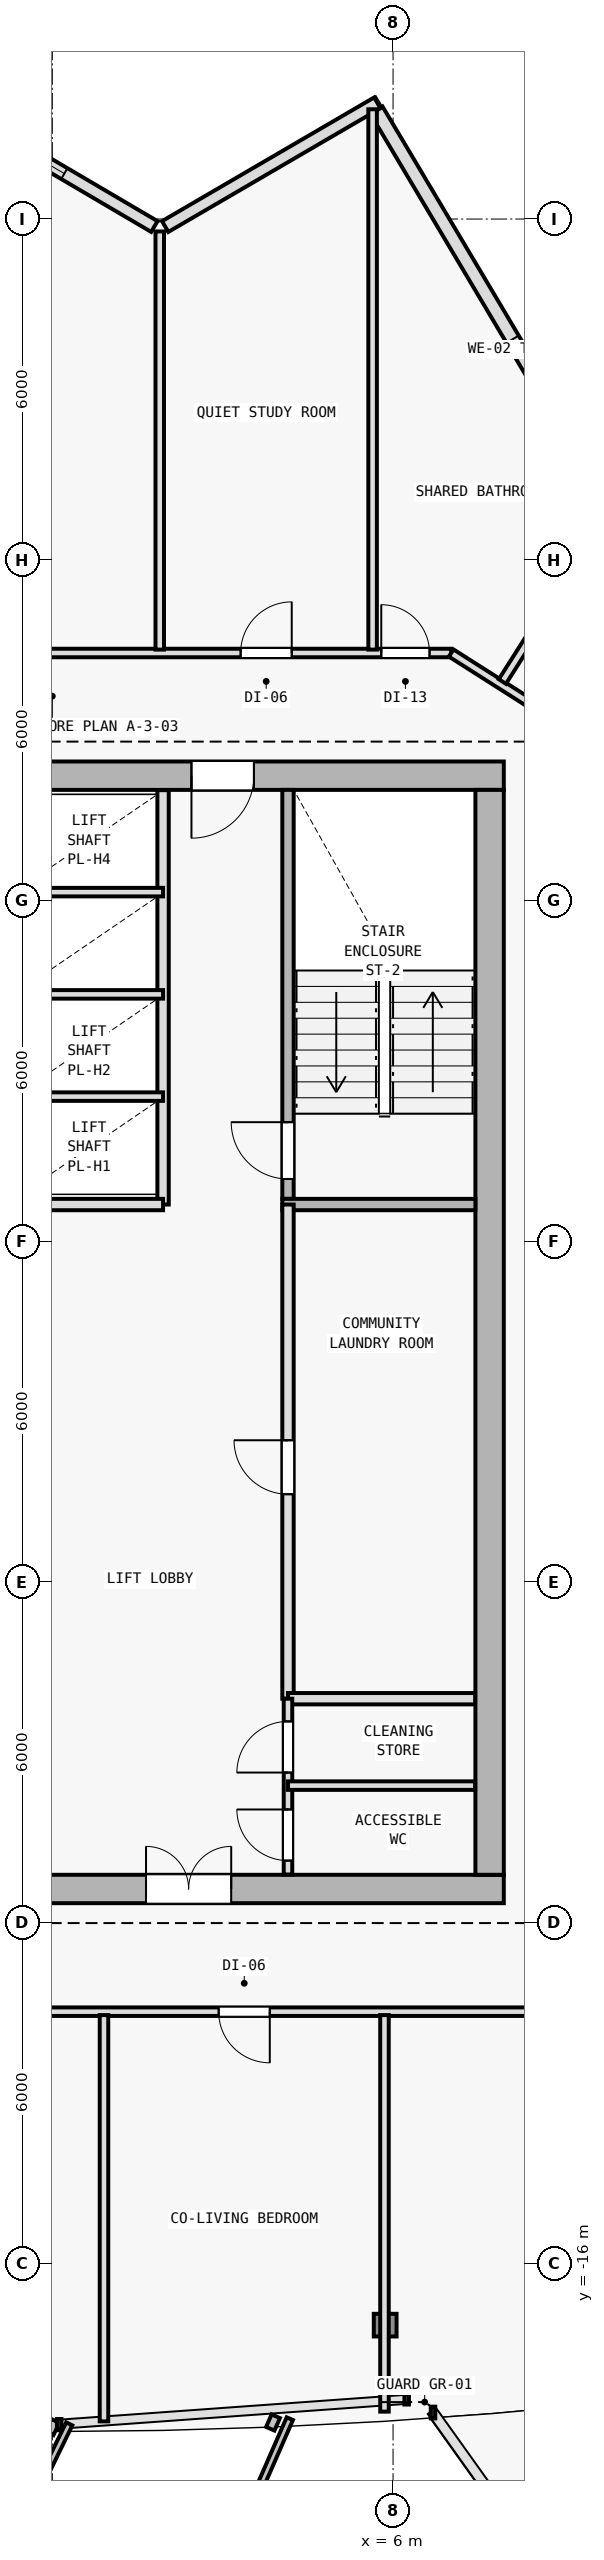
"""IFC4 building model, lengths in metres.
Left out: names, types, materials, properties, quantities, classifications, styles, units other than length and angle.
Written with IfcOpenShell. Run it as: python <this file> out.ifc"""

import sys

from ifc_helpers import new_model, si_unit, direction, frame, frame_2d, origin, origin_2d, place, context, subcontext, project, spatial, rectangle, i_section, extrude, element, fill, save


model = new_model("IFC4")
c1 = context("Model", 3, precision=1e-05, world=origin(), true_north=direction((0.0, 1.0)))
c2 = subcontext(c1, "Body", "Model", "MODEL_VIEW")
j1 = project(units=[si_unit("LENGTHUNIT", "METRE"), si_unit("PLANEANGLEUNIT", "RADIAN")], contexts=[c1])
p1 = place(None, origin())
s1 = spatial("IfcSite", under=j1, at=p1, CompositionType="ELEMENT")
p2 = place(p1, origin())
s2 = spatial("IfcBuilding", under=s1, at=p2, CompositionType="ELEMENT")
p3 = place(p2, frame((0.0, 0.0, 171.0)))
s3 = spatial("IfcBuildingStorey", under=s2, at=p3, CompositionType="ELEMENT", Elevation=171.0)
for number, where, z_axis, x_axis in (
    (1, (7.7, -9.4, 0.0), (0.0, 0.0, 1.0), (1.0, 0.0, 0.0)),
    (2, (7.7, 10.2, 0.0), (0.0, 0.0, 1.0), (1.0, 0.0, 0.0)),
    (3, (0.0, -9.4, 0.0), (0.0, 0.0, 1.0), (1.0, 0.0, 0.0)),
    (4, (7.7, 0.4, 0.0), (0.0, 0.0, 1.0), (1.0, 0.0, 0.0)),
):
    element("IfcColumn", number, at=place(p3, frame(where, z_axis=z_axis, x_axis=x_axis)), inside=s3, PredefinedType="COLUMN", context=c2, shape_type="SweptSolid", body=[
        extrude(i_section(OverallWidth=0.404, OverallDepth=0.407, WebThickness=0.017, FlangeThickness=0.028, FilletRadius=0.015, at=origin_2d()), origin(), (0.0, 0.0, 1.0), 3.6),
    ])
p4 = place(p3, frame((5.861, -17.079, 0.006), z_axis=(-0.006934288159, 0.035283289748, 0.999353293441), x_axis=(-0.981229659911, -0.192842823335, 0.0)))
e5 = element("IfcColumn", 5, at=p4, inside=s3, PredefinedType="COLUMN", context=c2, shape_type="SweptSolid", body=[
    extrude(i_section(OverallWidth=0.401, OverallDepth=0.399, WebThickness=0.016, FlangeThickness=0.025, FilletRadius=0.015, at=origin_2d()), origin(), (0.0, 0.0, 1.0), 3.591),
])
p5 = place(p3, frame((5.706, 21.919, 0.0), z_axis=(0.0, 0.0, 1.0), x_axis=(0.511079110892, -0.859533677298, 0.0)))
e6 = element("IfcWall", 6, at=p5, inside=s3, PredefinedType="SOLIDWALL", context=c2, shape_type="SweptSolid", body=[
    extrude(rectangle(XDim=10.489, YDim=0.25, at=frame_2d((5.245, 0.0))), origin(), (0.0, 0.0, 1.0), 3.35),
])
p6 = place(p5, frame((4.695, 0.0, 0.62)))
e7 = element("IfcOpeningElement", 7, at=p6, cuts=e6, PredefinedType="OPENING", context=c2, shape_type="SweptSolid", body=[
    extrude(rectangle(XDim=1.1, YDim=1.8, at=frame_2d((0.55, 0.9))), frame((0.0, 0.135, 0.0), z_axis=(0.0, -1.0, 0.0), x_axis=(1.0, 0.0, 0.0)), (0.0, 0.0, 1.0), 0.27),
])
p7 = place(p3, frame((1.987, 19.868, 0.0), z_axis=(0.0, 0.0, 1.0), x_axis=(0.863979520686, 0.503526948469, 0.0)))
e8 = element("IfcWall", 8, at=p7, inside=s3, PredefinedType="SOLIDWALL", context=c2, shape_type="SweptSolid", body=[
    extrude(rectangle(XDim=4.324, YDim=0.22, at=frame_2d((2.162, 0.0))), origin(), (0.0, 0.0, 1.0), 3.35),
])
p8 = place(p3, frame((-2.322, 22.289, 0.0), z_axis=(0.0, 0.0, 1.0), x_axis=(0.862111523483, -0.506718581738, 0.0)))
e9 = element("IfcWall", 9, at=p8, inside=s3, PredefinedType="SOLIDWALL", context=c2, shape_type="SweptSolid", body=[
    extrude(rectangle(XDim=4.777, YDim=0.22, at=frame_2d((2.389, 0.0))), origin(), (0.0, 0.0, 1.0), 3.35),
])
p9 = place(p8, frame((1.839, 0.0, 0.62)))
e10 = element("IfcOpeningElement", 10, at=p9, cuts=e9, PredefinedType="OPENING", context=c2, shape_type="SweptSolid", body=[
    extrude(rectangle(XDim=1.1, YDim=1.8, at=frame_2d((0.55, 0.9))), frame((0.0, 0.12, 0.0), z_axis=(0.0, -1.0, 0.0), x_axis=(1.0, 0.0, 0.0)), (0.0, 0.0, 1.0), 0.24),
])
p10 = place(p3, frame((-7.95, -9.4, 0.0), z_axis=(0.0, 0.0, 1.0), x_axis=(1.0, 0.0, 0.0)))
e11 = element("IfcWall", 11, at=p10, inside=s3, PredefinedType="SHEAR", context=c2, shape_type="SweptSolid", body=[
    extrude(rectangle(XDim=15.9, YDim=0.5, at=frame_2d((7.95, 0.0))), origin(), (0.0, 0.0, 1.0), 3.35),
])
p11 = place(p10, frame((9.6, 0.0, 0.0)))
e12 = element("IfcOpeningElement", 12, at=p11, cuts=e11, PredefinedType="OPENING", context=c2, shape_type="SweptSolid", body=[
    extrude(rectangle(XDim=1.5, YDim=2.2, at=frame_2d((0.75, 1.1))), frame((0.0, 0.26, 0.0), z_axis=(0.0, -1.0, 0.0), x_axis=(1.0, 0.0, 0.0)), (0.0, 0.0, 1.0), 0.52),
])
p12 = place(p3, frame((7.95, 10.2, 0.0), z_axis=(0.0, 0.0, 1.0), x_axis=(-1.0, 0.0, 0.0)))
e13 = element("IfcWall", 13, at=p12, inside=s3, PredefinedType="SHEAR", context=c2, shape_type="SweptSolid", body=[
    extrude(rectangle(XDim=15.9, YDim=0.5, at=frame_2d((7.95, 0.0))), origin(), (0.0, 0.0, 1.0), 3.35),
])
p13 = place(p12, frame((4.4, 0.0, 0.0)))
e14 = element("IfcOpeningElement", 14, at=p13, cuts=e13, PredefinedType="OPENING", context=c2, shape_type="SweptSolid", body=[
    extrude(rectangle(XDim=1.1, YDim=2.15, at=frame_2d((0.55, 1.075))), frame((0.0, 0.26, 0.0), z_axis=(0.0, -1.0, 0.0), x_axis=(1.0, 0.0, 0.0)), (0.0, 0.0, 1.0), 0.52),
])
p14 = place(p3, frame((7.7, 9.95, 0.0), z_axis=(0.0, 0.0, 1.0), x_axis=(0.0, -1.0, 0.0)))
e15 = element("IfcWall", 15, at=p14, inside=s3, PredefinedType="SHEAR", context=c2, shape_type="SweptSolid", body=[
    extrude(rectangle(XDim=19.1, YDim=0.5, at=frame_2d((9.55, 0.0))), origin(), (0.0, 0.0, 1.0), 3.35),
])
p15 = place(p3, frame((4.15, 2.75, 0.0), z_axis=(0.0, 0.0, 1.0), x_axis=(0.0, 1.0, 0.0)))
e16 = element("IfcWall", 16, at=p15, inside=s3, PredefinedType="SOLIDWALL", context=c2, shape_type="SweptSolid", body=[
    extrude(rectangle(XDim=7.2, YDim=0.2, at=frame_2d((3.6, 0.0))), origin(), (0.0, 0.0, 1.0), 3.35),
])
p16 = place(p15, frame((0.35, 0.0, 0.0)))
e17 = element("IfcOpeningElement", 17, at=p16, cuts=e16, PredefinedType="OPENING", context=c2, shape_type="SweptSolid", body=[
    extrude(rectangle(XDim=1.0, YDim=2.15, at=frame_2d((0.5, 1.075))), frame((0.0, 0.11, 0.0), z_axis=(0.0, -1.0, 0.0), x_axis=(1.0, 0.0, 0.0)), (0.0, 0.0, 1.0), 0.22),
])
p17 = place(p3, frame((4.05, 2.65, 0.0), z_axis=(0.0, 0.0, 1.0), x_axis=(1.0, 0.0, 0.0)))
e18 = element("IfcWall", 18, at=p17, inside=s3, PredefinedType="SOLIDWALL", context=c2, shape_type="SweptSolid", body=[
    extrude(rectangle(XDim=3.4, YDim=0.2, at=frame_2d((1.7, 0.0))), origin(), (0.0, 0.0, 1.0), 3.35),
])
p18 = place(p3, frame((4.15, -6.05, 0.0), z_axis=(0.0, 0.0, 1.0), x_axis=(0.0, 1.0, 0.0)))
e19 = element("IfcWall", 19, at=p18, inside=s3, PredefinedType="SOLIDWALL", context=c2, shape_type="SweptSolid", body=[
    extrude(rectangle(XDim=8.7, YDim=0.2, at=frame_2d((4.35, 0.0))), origin(), (0.0, 0.0, 1.0), 3.35),
])
p19 = place(p18, frame((3.6, 0.0, 0.0)))
e20 = element("IfcOpeningElement", 20, at=p19, cuts=e19, PredefinedType="OPENING", context=c2, shape_type="SweptSolid", body=[
    extrude(rectangle(XDim=0.95, YDim=2.1, at=frame_2d((0.475, 1.05))), frame((0.0, 0.11, 0.0), z_axis=(0.0, -1.0, 0.0), x_axis=(1.0, 0.0, 0.0)), (0.0, 0.0, 1.0), 0.22),
])
p20 = place(p3, frame((1.95, 2.65, 0.0), z_axis=(0.0, 0.0, 1.0), x_axis=(0.0, 1.0, 0.0)))
e21 = element("IfcWall", 21, at=p20, inside=s3, PredefinedType="SOLIDWALL", context=c2, shape_type="SweptSolid", body=[
    extrude(rectangle(XDim=7.295, YDim=0.2, at=frame_2d((3.647, 0.0))), origin(), (0.0, 0.0, 1.0), 3.35),
])
p21 = place(p3, frame((-0.95, 2.65, 0.0), z_axis=(0.0, 0.0, 1.0), x_axis=(1.0, 0.0, 0.0)))
e22 = element("IfcWall", 22, at=p21, inside=s3, PredefinedType="SOLIDWALL", context=c2, shape_type="SweptSolid", body=[
    extrude(rectangle(XDim=2.9, YDim=0.2, at=frame_2d((1.45, 0.0))), origin(), (0.0, 0.0, 1.0), 3.35),
])
for number, where, z_axis, x_axis in (
    (23, (-0.75, 4.55, 0.0), (0.0, 0.0, 1.0), (1.0, 0.0, 0.0)),
    (24, (-0.75, 6.35, 0.0), (0.0, 0.0, 1.0), (1.0, 0.0, 0.0)),
    (25, (-0.75, 8.15, 0.0), (0.0, 0.0, 1.0), (1.0, 0.0, 0.0)),
):
    element("IfcWall", number, at=place(p3, frame(where, z_axis=z_axis, x_axis=x_axis)), inside=s3, PredefinedType="PARTITIONING", context=c2, shape_type="SweptSolid", body=[
        extrude(rectangle(XDim=2.7, YDim=0.15, at=frame_2d((1.35, 0.0))), origin(), (0.0, 0.0, 1.0), 3.35),
    ])
p22 = place(p3, frame((4.15, -6.05, 0.0), z_axis=(0.0, 0.0, 1.0), x_axis=(1.0, 0.0, 0.0)))
e26 = element("IfcWall", 26, at=p22, inside=s3, PredefinedType="SOLIDWALL", context=c2, shape_type="SweptSolid", body=[
    extrude(rectangle(XDim=3.295, YDim=0.2, at=frame_2d((1.647, 0.0))), origin(), (0.0, 0.0, 1.0), 3.35),
])
p23 = place(p3, frame((4.15, -9.145, 0.0), z_axis=(0.0, 0.0, 1.0), x_axis=(0.0, 1.0, 0.0)))
e27 = element("IfcWall", 27, at=p23, inside=s3, PredefinedType="PARTITIONING", context=c2, shape_type="SweptSolid", body=[
    extrude(rectangle(XDim=3.095, YDim=0.15, at=frame_2d((1.547, 0.0))), origin(), (0.0, 0.0, 1.0), 3.35),
])
p24 = place(p23, frame((0.245, 0.0, 0.0)))
e28 = element("IfcOpeningElement", 28, at=p24, cuts=e27, PredefinedType="OPENING", context=c2, shape_type="SweptSolid", body=[
    extrude(rectangle(XDim=0.9, YDim=2.1, at=frame_2d((0.45, 1.05))), frame((0.0, 0.085, 0.0), z_axis=(0.0, -1.0, 0.0), x_axis=(1.0, 0.0, 0.0)), (0.0, 0.0, 1.0), 0.17),
])
p25 = place(p23, frame((1.795, 0.0, 0.0)))
e29 = element("IfcOpeningElement", 29, at=p25, cuts=e27, PredefinedType="OPENING", context=c2, shape_type="SweptSolid", body=[
    extrude(rectangle(XDim=0.9, YDim=2.1, at=frame_2d((0.45, 1.05))), frame((0.0, 0.085, 0.0), z_axis=(0.0, -1.0, 0.0), x_axis=(1.0, 0.0, 0.0)), (0.0, 0.0, 1.0), 0.17),
])
p26 = place(p3, frame((4.15, -7.58, 0.0), z_axis=(0.0, 0.0, 1.0), x_axis=(1.0, 0.0, 0.0)))
e30 = element("IfcWall", 30, at=p26, inside=s3, PredefinedType="PARTITIONING", context=c2, shape_type="SweptSolid", body=[
    extrude(rectangle(XDim=3.295, YDim=0.15, at=frame_2d((1.647, 0.0))), origin(), (0.0, 0.0, 1.0), 3.35),
])
p27 = place(p3, frame((-7.041, 12.36, 0.0), z_axis=(0.0, 0.0, 1.0), x_axis=(1.0, 0.0, 0.0)))
e31 = element("IfcWall", 31, at=p27, inside=s3, PredefinedType="PARTITIONING", context=c2, shape_type="SweptSolid", body=[
    extrude(rectangle(XDim=14.064, YDim=0.15, at=frame_2d((7.032, 0.0))), origin(), (0.0, 0.0, 1.0), 2.965),
])
p28 = place(p27, frame((12.833, 0.0, 0.0)))
e32 = element("IfcOpeningElement", 32, at=p28, cuts=e31, PredefinedType="OPENING", context=c2, shape_type="SweptSolid", body=[
    extrude(rectangle(XDim=0.85, YDim=2.1, at=frame_2d((0.425, 1.05))), frame((0.0, 0.085, 0.0), z_axis=(0.0, -1.0, 0.0), x_axis=(1.0, 0.0, 0.0)), (0.0, 0.0, 1.0), 0.17),
])
p29 = place(p27, frame((10.357, 0.0, 0.0)))
e33 = element("IfcOpeningElement", 33, at=p29, cuts=e31, PredefinedType="OPENING", context=c2, shape_type="SweptSolid", body=[
    extrude(rectangle(XDim=0.9, YDim=2.1, at=frame_2d((0.45, 1.05))), frame((0.0, 0.085, 0.0), z_axis=(0.0, -1.0, 0.0), x_axis=(1.0, 0.0, 0.0)), (0.0, 0.0, 1.0), 0.17),
])
p30 = place(p27, frame((4.167, 0.0, 0.0)))
e34 = element("IfcOpeningElement", 34, at=p30, cuts=e31, PredefinedType="OPENING", context=c2, shape_type="SweptSolid", body=[
    extrude(rectangle(XDim=0.9, YDim=2.1, at=frame_2d((0.45, 1.05))), frame((0.0, 0.085, 0.0), z_axis=(0.0, -1.0, 0.0), x_axis=(1.0, 0.0, 0.0)), (0.0, 0.0, 1.0), 0.17),
])
p31 = place(p3, frame((7.023, 12.36, 0.0), z_axis=(0.0, 0.0, 1.0), x_axis=(0.84376480085, -0.536713108511, 0.0)))
e35 = element("IfcWall", 35, at=p31, inside=s3, PredefinedType="PARTITIONING", context=c2, shape_type="SweptSolid", body=[
    extrude(rectangle(XDim=7.297, YDim=0.15, at=frame_2d((3.648, 0.0))), origin(), (0.0, 0.0, 1.0), 2.935),
])
p32 = place(p31, frame((3.624, 0.0, 0.0)))
e36 = element("IfcOpeningElement", 36, at=p32, cuts=e35, PredefinedType="OPENING", context=c2, shape_type="SweptSolid", body=[
    extrude(rectangle(XDim=0.9, YDim=2.1, at=frame_2d((0.45, 1.05))), frame((0.0, 0.085, 0.0), z_axis=(0.0, -1.0, 0.0), x_axis=(1.0, 0.0, 0.0)), (0.0, 0.0, 1.0), 0.17),
])
p33 = place(p3, frame((13.18, -11.56, 0.0), z_axis=(0.0, 0.0, 1.0), x_axis=(-1.0, 0.0, 0.0)))
e37 = element("IfcWall", 37, at=p33, inside=s3, PredefinedType="PARTITIONING", context=c2, shape_type="SweptSolid", body=[
    extrude(rectangle(XDim=23.04, YDim=0.15, at=frame_2d((11.52, 0.0))), origin(), (0.0, 0.0, 1.0), 2.825),
])
p34 = place(p33, frame((19.585, 0.0, 0.0)))
e38 = element("IfcOpeningElement", 38, at=p34, cuts=e37, PredefinedType="OPENING", context=c2, shape_type="SweptSolid", body=[
    extrude(rectangle(XDim=0.9, YDim=2.1, at=frame_2d((0.45, 1.05))), frame((0.0, 0.085, 0.0), z_axis=(0.0, -1.0, 0.0), x_axis=(1.0, 0.0, 0.0)), (0.0, 0.0, 1.0), 0.17),
])
p35 = place(p33, frame((14.29, 0.0, 0.0)))
e39 = element("IfcOpeningElement", 39, at=p35, cuts=e37, PredefinedType="OPENING", context=c2, shape_type="SweptSolid", body=[
    extrude(rectangle(XDim=0.9, YDim=2.1, at=frame_2d((0.45, 1.05))), frame((0.0, 0.085, 0.0), z_axis=(0.0, -1.0, 0.0), x_axis=(1.0, 0.0, 0.0)), (0.0, 0.0, 1.0), 0.17),
])
p36 = place(p33, frame((9.351, 0.0, 0.0)))
e40 = element("IfcOpeningElement", 40, at=p36, cuts=e37, PredefinedType="OPENING", context=c2, shape_type="SweptSolid", body=[
    extrude(rectangle(XDim=0.9, YDim=2.1, at=frame_2d((0.45, 1.05))), frame((0.0, 0.085, 0.0), z_axis=(0.0, -1.0, 0.0), x_axis=(1.0, 0.0, 0.0)), (0.0, 0.0, 1.0), 0.17),
])
p37 = place(p33, frame((3.305, 0.0, 0.0)))
e41 = element("IfcOpeningElement", 41, at=p37, cuts=e37, PredefinedType="OPENING", context=c2, shape_type="SweptSolid", body=[
    extrude(rectangle(XDim=0.9, YDim=2.1, at=frame_2d((0.45, 1.05))), frame((0.0, 0.085, 0.0), z_axis=(0.0, -1.0, 0.0), x_axis=(1.0, 0.0, 0.0)), (0.0, 0.0, 1.0), 0.17),
])
p38 = place(p3, frame((5.849, -11.62, 0.0), z_axis=(0.0, 0.0, 1.0), x_axis=(0.0, -1.0, 0.0)))
e42 = element("IfcWall", 42, at=p38, inside=s3, PredefinedType="PARTITIONING", context=c2, shape_type="SweptSolid", body=[
    extrude(rectangle(XDim=6.981, YDim=0.15, at=frame_2d((3.491, 0.0))), origin(), (0.0, 0.0, 1.0), 2.775),
])
p39 = place(p3, frame((7.925, 11.858, 0.0), z_axis=(0.0, 0.0, 1.0), x_axis=(0.536716115778, 0.84376288794, 0.0)))
e43 = element("IfcWall", 43, at=p39, inside=s3, PredefinedType="PARTITIONING", context=c2, shape_type="SweptSolid", body=[
    extrude(rectangle(XDim=3.569, YDim=0.15, at=frame_2d((1.784, 0.0))), origin(), (0.0, 0.0, 1.0), 2.935),
])
p40 = place(p3, frame((1.892, 12.42, 0.0), z_axis=(0.0, 0.0, 1.0), x_axis=(0.0, 1.0, 0.0)))
e44 = element("IfcWall", 44, at=p40, inside=s3, PredefinedType="PARTITIONING", context=c2, shape_type="SweptSolid", body=[
    extrude(rectangle(XDim=7.362, YDim=0.15, at=frame_2d((3.681, 0.0))), origin(), (0.0, 0.0, 1.0), 2.935),
])
p41 = place(p3, frame((5.64, 12.42, 0.0), z_axis=(0.0, 0.0, 1.0), x_axis=(0.0, 1.0, 0.0)))
e45 = element("IfcWall", 45, at=p41, inside=s3, PredefinedType="PARTITIONING", context=c2, shape_type="SweptSolid", body=[
    extrude(rectangle(XDim=9.513, YDim=0.15, at=frame_2d((4.756, 0.0))), origin(), (0.0, 0.0, 1.0), 2.935),
])
p42 = place(p3, frame((0.91, -11.62, 0.0), z_axis=(0.0, 0.0, 1.0), x_axis=(0.0, -1.0, 0.0)))
e46 = element("IfcWall", 46, at=p42, inside=s3, PredefinedType="PARTITIONING", context=c2, shape_type="SweptSolid", body=[
    extrude(rectangle(XDim=7.153, YDim=0.15, at=frame_2d((3.576, 0.0))), origin(), (0.0, 0.0, 1.0), 2.875),
])
p43 = place(p6, origin())
e47 = element("IfcWindow", 47, at=p43, inside=s3, PartitioningType="SINGLE_PANEL", PredefinedType="WINDOW", context=c2, shape_type="SweptSolid", body=[
    extrude(rectangle(XDim=1.1, YDim=1.8, at=frame_2d((0.55, 0.9))), frame((0.0, 0.03, 0.0), z_axis=(0.0, -1.0, 0.0), x_axis=(1.0, 0.0, 0.0)), (0.0, 0.0, 1.0), 0.06),
])
fill(e7, e47)
p44 = place(p9, origin())
e48 = element("IfcWindow", 48, at=p44, inside=s3, PartitioningType="SINGLE_PANEL", PredefinedType="WINDOW", context=c2, shape_type="SweptSolid", body=[
    extrude(rectangle(XDim=1.1, YDim=1.8, at=frame_2d((0.55, 0.9))), frame((0.0, 0.03, 0.0), z_axis=(0.0, -1.0, 0.0), x_axis=(1.0, 0.0, 0.0)), (0.0, 0.0, 1.0), 0.06),
])
fill(e10, e48)
p45 = place(p11, origin())
e49 = element("IfcDoor", 49, at=p45, inside=s3, OperationType="DOUBLE_DOOR_SINGLE_SWING", PredefinedType="DOOR", context=c2, shape_type="SweptSolid", body=[
    extrude(rectangle(XDim=1.5, YDim=2.2, at=frame_2d((0.75, 1.1))), frame((0.0, 0.025, 0.0), z_axis=(0.0, -1.0, 0.0), x_axis=(1.0, 0.0, 0.0)), (0.0, 0.0, 1.0), 0.05),
])
fill(e12, e49)
p46 = place(p13, origin())
e50 = element("IfcDoor", 50, at=p46, inside=s3, OperationType="SINGLE_SWING_RIGHT", PredefinedType="DOOR", context=c2, shape_type="SweptSolid", body=[
    extrude(rectangle(XDim=1.1, YDim=2.15, at=frame_2d((0.55, 1.075))), frame((0.0, 0.025, 0.0), z_axis=(0.0, -1.0, 0.0), x_axis=(1.0, 0.0, 0.0)), (0.0, 0.0, 1.0), 0.05),
])
fill(e14, e50)
p47 = place(p16, origin())
e51 = element("IfcDoor", 51, at=p47, inside=s3, OperationType="SINGLE_SWING_RIGHT", PredefinedType="DOOR", context=c2, shape_type="SweptSolid", body=[
    extrude(rectangle(XDim=1.0, YDim=2.15, at=frame_2d((0.5, 1.075))), frame((0.0, 0.025, 0.0), z_axis=(0.0, -1.0, 0.0), x_axis=(1.0, 0.0, 0.0)), (0.0, 0.0, 1.0), 0.05),
])
fill(e17, e51)
p48 = place(p19, origin())
e52 = element("IfcDoor", 52, at=p48, inside=s3, OperationType="SINGLE_SWING_RIGHT", PredefinedType="DOOR", context=c2, shape_type="SweptSolid", body=[
    extrude(rectangle(XDim=0.95, YDim=2.1, at=frame_2d((0.475, 1.05))), frame((0.0, 0.025, 0.0), z_axis=(0.0, -1.0, 0.0), x_axis=(1.0, 0.0, 0.0)), (0.0, 0.0, 1.0), 0.05),
])
fill(e20, e52)
p49 = place(p24, origin())
e53 = element("IfcDoor", 53, at=p49, inside=s3, OperationType="SINGLE_SWING_RIGHT", PredefinedType="DOOR", context=c2, shape_type="SweptSolid", body=[
    extrude(rectangle(XDim=0.9, YDim=2.1, at=frame_2d((0.45, 1.05))), frame((0.0, 0.025, 0.0), z_axis=(0.0, -1.0, 0.0), x_axis=(1.0, 0.0, 0.0)), (0.0, 0.0, 1.0), 0.05),
])
fill(e28, e53)
p50 = place(p25, origin())
e54 = element("IfcDoor", 54, at=p50, inside=s3, OperationType="SINGLE_SWING_LEFT", PredefinedType="DOOR", context=c2, shape_type="SweptSolid", body=[
    extrude(rectangle(XDim=0.9, YDim=2.1, at=frame_2d((0.45, 1.05))), frame((0.0, 0.025, 0.0), z_axis=(0.0, -1.0, 0.0), x_axis=(1.0, 0.0, 0.0)), (0.0, 0.0, 1.0), 0.05),
])
fill(e29, e54)
p51 = place(p36, origin())
e55 = element("IfcDoor", 55, at=p51, inside=s3, OperationType="SINGLE_SWING_LEFT", PredefinedType="DOOR", context=c2, shape_type="SweptSolid", body=[
    extrude(rectangle(XDim=0.9, YDim=2.1, at=frame_2d((0.45, 1.05))), frame((0.0, 0.025, 0.0), z_axis=(0.0, -1.0, 0.0), x_axis=(1.0, 0.0, 0.0)), (0.0, 0.0, 1.0), 0.05),
])
fill(e40, e55)
p52 = place(p28, origin())
e56 = element("IfcDoor", 56, at=p52, inside=s3, OperationType="SINGLE_SWING_LEFT", PredefinedType="DOOR", context=c2, shape_type="SweptSolid", body=[
    extrude(rectangle(XDim=0.85, YDim=2.1, at=frame_2d((0.425, 1.05))), frame((0.0, 0.025, 0.0), z_axis=(0.0, -1.0, 0.0), x_axis=(1.0, 0.0, 0.0)), (0.0, 0.0, 1.0), 0.05),
])
fill(e32, e56)
p53 = place(p29, origin())
e57 = element("IfcDoor", 57, at=p53, inside=s3, OperationType="SINGLE_SWING_RIGHT", PredefinedType="DOOR", context=c2, shape_type="SweptSolid", body=[
    extrude(rectangle(XDim=0.9, YDim=2.1, at=frame_2d((0.45, 1.05))), frame((0.0, 0.025, 0.0), z_axis=(0.0, -1.0, 0.0), x_axis=(1.0, 0.0, 0.0)), (0.0, 0.0, 1.0), 0.05),
])
fill(e33, e57)
save(model, sys.argv[1])
